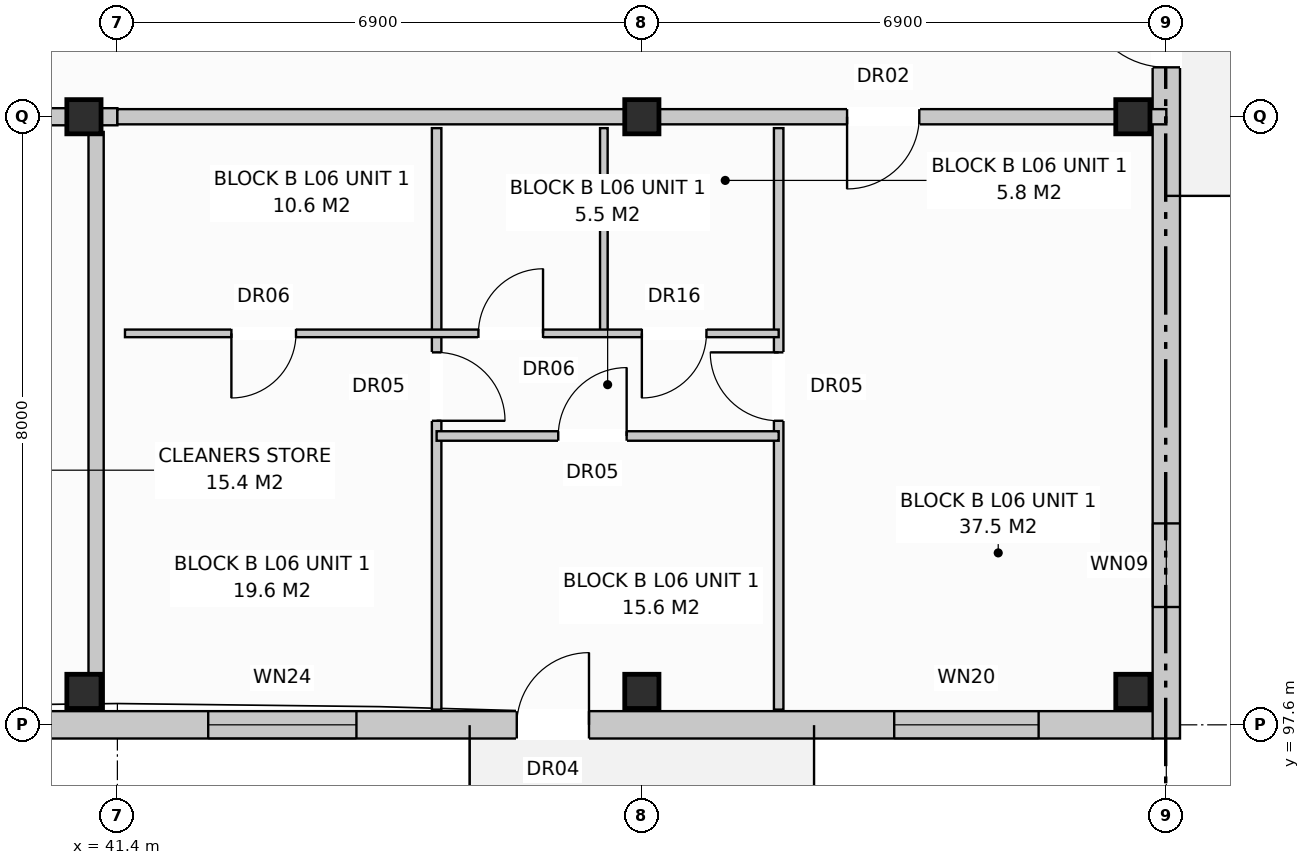
"""IFC4 building model, lengths in metres.
Left out: names, types, materials, properties, quantities, classifications, styles, units other than length and angle.
Written with IfcOpenShell. Run it as: python <this file> out.ifc"""

import sys

from ifc_helpers import new_model, si_unit, direction, frame, frame_2d, origin, origin_with_axes, origin_2d, place, context, subcontext, project, spatial, rectangle, extrude, element, fill, save


model = new_model("IFC4")
c1 = context("Model", 3, precision=1e-05, world=origin(), true_north=direction((0.0, 1.0)))
c2 = subcontext(c1, "Body", "Model", "MODEL_VIEW")
j1 = project(units=[si_unit("LENGTHUNIT", "METRE"), si_unit("PLANEANGLEUNIT", "RADIAN")], contexts=[c1])
p1 = place(None, origin())
s1 = spatial("IfcSite", under=j1, at=p1, CompositionType="ELEMENT")
p2 = place(p1, origin())
s2 = spatial("IfcBuilding", under=s1, at=p2, CompositionType="ELEMENT")
p3 = place(p2, frame((0.0, 0.0, 20.8)))
s3 = spatial("IfcBuildingStorey", under=s2, at=p3, CompositionType="ELEMENT", Elevation=20.8)
for number, where, z_axis, x_axis in (
    (1, (40.96, 98.04, 0.0), (0.0, 0.0, 1.0), (1.0, 0.0, 0.0)),
    (2, (40.96, 105.6, 0.0), (0.0, 0.0, 1.0), (1.0, 0.0, 0.0)),
    (3, (48.3, 98.04, 0.0), (0.0, 0.0, 1.0), (1.0, 0.0, 0.0)),
    (4, (48.3, 105.6, 0.0), (0.0, 0.0, 1.0), (1.0, 0.0, 0.0)),
    (5, (54.76, 98.04, 0.0), (0.0, 0.0, 1.0), (1.0, 0.0, 0.0)),
    (6, (54.76, 105.6, 0.0), (0.0, 0.0, 1.0), (1.0, 0.0, 0.0)),
):
    element("IfcColumn", number, at=place(p3, frame(where, z_axis=z_axis, x_axis=x_axis)), inside=s3, PredefinedType="COLUMN", context=c2, shape_type="SweptSolid", body=[
        extrude(rectangle(XDim=0.45, YDim=0.45, at=origin_2d()), origin(), (0.0, 0.0, 1.0), 3.2),
    ])
p4 = place(p3, frame((31.35, 97.6, 0.0), z_axis=(0.0, 0.0, 1.0), x_axis=(1.0, 0.0, 0.0)))
e7 = element("IfcWall", 7, at=p4, inside=s3, PredefinedType="STANDARD", context=c2, shape_type="SweptSolid", body=[
    extrude(rectangle(XDim=23.68, YDim=0.36, at=frame_2d((11.84, 0.0))), origin(), (0.0, 0.0, 1.0), 2.95),
])
p5 = place(p4, frame((15.304, 0.0, 0.0)))
e8 = element("IfcOpeningElement", 8, at=p5, cuts=e7, PredefinedType="OPENING", context=c2, shape_type="SweptSolid", body=[
    extrude(rectangle(XDim=0.95, YDim=2.1, at=frame_2d((0.475, 1.05))), frame((0.0, 0.192, 0.0), z_axis=(0.0, -1.0, 0.0), x_axis=(1.0, 0.0, 0.0)), (0.0, 0.0, 1.0), 0.384),
])
p6 = place(p4, frame((11.245, 0.0, 0.8)))
e9 = element("IfcOpeningElement", 9, at=p6, cuts=e7, PredefinedType="OPENING", context=c2, shape_type="SweptSolid", body=[
    extrude(rectangle(XDim=1.95, YDim=1.65, at=frame_2d((0.975, 0.825))), frame((0.0, 0.192, 0.0), z_axis=(0.0, -1.0, 0.0), x_axis=(1.0, 0.0, 0.0)), (0.0, 0.0, 1.0), 0.384),
])
p7 = place(p4, frame((20.27, 0.0, 0.8)))
e10 = element("IfcOpeningElement", 10, at=p7, cuts=e7, PredefinedType="OPENING", context=c2, shape_type="SweptSolid", body=[
    extrude(rectangle(XDim=1.9, YDim=1.85, at=frame_2d((0.95, 0.925))), frame((0.0, 0.192, 0.0), z_axis=(0.0, -1.0, 0.0), x_axis=(1.0, 0.0, 0.0)), (0.0, 0.0, 1.0), 0.384),
])
p8 = place(p3, frame((55.2, 97.42, 0.0), z_axis=(0.0, 0.0, 1.0), x_axis=(0.0, 1.0, 0.0)))
e11 = element("IfcWall", 11, at=p8, inside=s3, PredefinedType="STANDARD", context=c2, shape_type="SweptSolid", body=[
    extrude(rectangle(XDim=18.76, YDim=0.36, at=frame_2d((9.38, 0.0))), origin(), (0.0, 0.0, 1.0), 2.95),
])
p9 = place(p8, frame((8.83, 0.0, 0.0)))
e12 = element("IfcOpeningElement", 12, at=p9, cuts=e11, PredefinedType="OPENING", context=c2, shape_type="SweptSolid", body=[
    extrude(rectangle(XDim=1.1, YDim=2.1, at=frame_2d((0.55, 1.05))), frame((0.0, 0.192, 0.0), z_axis=(0.0, -1.0, 0.0), x_axis=(1.0, 0.0, 0.0)), (0.0, 0.0, 1.0), 0.384),
])
p10 = place(p8, frame((1.73, 0.0, 0.72)))
e13 = element("IfcOpeningElement", 13, at=p10, cuts=e11, PredefinedType="OPENING", context=c2, shape_type="SweptSolid", body=[
    extrude(rectangle(XDim=1.1, YDim=1.5, at=frame_2d((0.55, 0.75))), frame((0.0, 0.192, 0.0), z_axis=(0.0, -1.0, 0.0), x_axis=(1.0, 0.0, 0.0)), (0.0, 0.0, 1.0), 0.384),
])
p11 = place(p8, frame((15.93, 0.0, 0.72)))
e14 = element("IfcOpeningElement", 14, at=p11, cuts=e11, PredefinedType="OPENING", context=c2, shape_type="SweptSolid", body=[
    extrude(rectangle(XDim=1.1, YDim=1.5, at=frame_2d((0.55, 0.75))), frame((0.0, 0.192, 0.0), z_axis=(0.0, -1.0, 0.0), x_axis=(1.0, 0.0, 0.0)), (0.0, 0.0, 1.0), 0.384),
])
p12 = place(p3, frame((41.12, 97.8, 0.0), z_axis=(0.0, 0.0, 1.0), x_axis=(0.0, 1.0, 0.0)))
e15 = element("IfcWall", 15, at=p12, inside=s3, PredefinedType="PARTITIONING", context=c2, shape_type="SweptSolid", body=[
    extrude(rectangle(XDim=7.6, YDim=0.2, at=frame_2d((3.8, 0.0))), origin(), (0.0, 0.0, 1.0), 2.39),
])
p13 = place(p3, frame((31.5, 105.6, 0.0), z_axis=(0.0, 0.0, 1.0), x_axis=(1.0, 0.0, 0.0)))
e16 = element("IfcWall", 16, at=p13, inside=s3, PredefinedType="PARTITIONING", context=c2, shape_type="SweptSolid", body=[
    extrude(rectangle(XDim=9.9, YDim=0.225, at=frame_2d((4.95, 0.0))), origin(), (0.0, 0.0, 1.0), 2.39),
])
p14 = place(p13, frame((0.475, 0.0, 0.0)))
e17 = element("IfcOpeningElement", 17, at=p14, cuts=e16, PredefinedType="OPENING", context=c2, shape_type="SweptSolid", body=[
    extrude(rectangle(XDim=1.1, YDim=2.15, at=frame_2d((0.55, 1.075))), frame((0.0, 0.125, 0.0), z_axis=(0.0, -1.0, 0.0), x_axis=(1.0, 0.0, 0.0)), (0.0, 0.0, 1.0), 0.249),
])
p15 = place(p13, frame((5.75, 0.0, 0.0)))
e18 = element("IfcOpeningElement", 18, at=p15, cuts=e16, PredefinedType="OPENING", context=c2, shape_type="SweptSolid", body=[
    extrude(rectangle(XDim=0.9, YDim=2.1, at=frame_2d((0.45, 1.05))), frame((0.0, 0.125, 0.0), z_axis=(0.0, -1.0, 0.0), x_axis=(1.0, 0.0, 0.0)), (0.0, 0.0, 1.0), 0.249),
])
p16 = place(p13, frame((7.8, 0.0, 0.0)))
e19 = element("IfcOpeningElement", 19, at=p16, cuts=e16, PredefinedType="OPENING", context=c2, shape_type="SweptSolid", body=[
    extrude(rectangle(XDim=0.95, YDim=2.15, at=frame_2d((0.475, 1.075))), frame((0.0, 0.125, 0.0), z_axis=(0.0, -1.0, 0.0), x_axis=(1.0, 0.0, 0.0)), (0.0, 0.0, 1.0), 0.249),
])
p17 = place(p3, frame((41.4, 105.6, 0.0), z_axis=(0.0, 0.0, 1.0), x_axis=(1.0, 0.0, 0.0)))
e20 = element("IfcWall", 20, at=p17, inside=s3, PredefinedType="PARTITIONING", context=c2, shape_type="SweptSolid", body=[
    extrude(rectangle(XDim=13.8, YDim=0.2, at=frame_2d((6.9, 0.0))), origin(), (0.0, 0.0, 1.0), 2.39),
])
p18 = place(p17, frame((9.6, 0.0, 0.0)))
e21 = element("IfcOpeningElement", 21, at=p18, cuts=e20, PredefinedType="OPENING", context=c2, shape_type="SweptSolid", body=[
    extrude(rectangle(XDim=0.95, YDim=2.15, at=frame_2d((0.475, 1.075))), frame((0.0, 0.112, 0.0), z_axis=(0.0, -1.0, 0.0), x_axis=(1.0, 0.0, 0.0)), (0.0, 0.0, 1.0), 0.224),
])
p19 = place(p3, frame((50.1, 105.45, 0.0), z_axis=(0.0, 0.0, 1.0), x_axis=(0.0, -1.0, 0.0)))
e22 = element("IfcWall", 22, at=p19, inside=s3, PredefinedType="PARTITIONING", context=c2, shape_type="SweptSolid", body=[
    extrude(rectangle(XDim=7.65, YDim=0.125, at=frame_2d((3.825, 0.0))), origin(), (0.0, 0.0, 1.0), 2.95),
])
p20 = place(p19, frame((2.95, 0.0, 0.0)))
e23 = element("IfcOpeningElement", 23, at=p20, cuts=e22, PredefinedType="OPENING", context=c2, shape_type="SweptSolid", body=[
    extrude(rectangle(XDim=0.9, YDim=2.1, at=frame_2d((0.45, 1.05))), frame((0.0, 0.074, 0.0), z_axis=(0.0, -1.0, 0.0), x_axis=(1.0, 0.0, 0.0)), (0.0, 0.0, 1.0), 0.149),
])
p21 = place(p3, frame((45.6, 105.45, 0.0), z_axis=(0.0, 0.0, 1.0), x_axis=(0.0, -1.0, 0.0)))
e24 = element("IfcWall", 24, at=p21, inside=s3, PredefinedType="PARTITIONING", context=c2, shape_type="SweptSolid", body=[
    extrude(rectangle(XDim=7.65, YDim=0.125, at=frame_2d((3.825, 0.0))), origin(), (0.0, 0.0, 1.0), 2.95),
])
p22 = place(p21, frame((2.95, 0.0, 0.0)))
e25 = element("IfcOpeningElement", 25, at=p22, cuts=e24, PredefinedType="OPENING", context=c2, shape_type="SweptSolid", body=[
    extrude(rectangle(XDim=0.9, YDim=2.1, at=frame_2d((0.45, 1.05))), frame((0.0, 0.074, 0.0), z_axis=(0.0, -1.0, 0.0), x_axis=(1.0, 0.0, 0.0)), (0.0, 0.0, 1.0), 0.149),
])
p23 = place(p3, frame((47.8, 105.45, 0.0), z_axis=(0.0, 0.0, 1.0), x_axis=(0.0, -1.0, 0.0)))
e26 = element("IfcWall", 26, at=p23, inside=s3, PredefinedType="PARTITIONING", context=c2, shape_type="SweptSolid", body=[
    extrude(rectangle(XDim=2.7, YDim=0.1, at=frame_2d((1.35, 0.0))), origin(), (0.0, 0.0, 1.0), 2.95),
])
p24 = place(p3, frame((41.5, 102.75, 0.0), z_axis=(0.0, 0.0, 1.0), x_axis=(1.0, 0.0, 0.0)))
e27 = element("IfcWall", 27, at=p24, inside=s3, PredefinedType="PARTITIONING", context=c2, shape_type="SweptSolid", body=[
    extrude(rectangle(XDim=8.6, YDim=0.1, at=frame_2d((4.3, 0.0))), origin(), (0.0, 0.0, 1.0), 2.95),
])
p25 = place(p24, frame((1.4, 0.0, 0.0)))
e28 = element("IfcOpeningElement", 28, at=p25, cuts=e27, PredefinedType="OPENING", context=c2, shape_type="SweptSolid", body=[
    extrude(rectangle(XDim=0.85, YDim=2.05, at=frame_2d((0.425, 1.025))), frame((0.0, 0.062, 0.0), z_axis=(0.0, -1.0, 0.0), x_axis=(1.0, 0.0, 0.0)), (0.0, 0.0, 1.0), 0.124),
])
p26 = place(p24, frame((4.65, 0.0, 0.0)))
e29 = element("IfcOpeningElement", 29, at=p26, cuts=e27, PredefinedType="OPENING", context=c2, shape_type="SweptSolid", body=[
    extrude(rectangle(XDim=0.85, YDim=2.05, at=frame_2d((0.425, 1.025))), frame((0.0, 0.062, 0.0), z_axis=(0.0, -1.0, 0.0), x_axis=(1.0, 0.0, 0.0)), (0.0, 0.0, 1.0), 0.124),
])
p27 = place(p24, frame((6.8, 0.0, 0.0)))
e30 = element("IfcOpeningElement", 30, at=p27, cuts=e27, PredefinedType="OPENING", context=c2, shape_type="SweptSolid", body=[
    extrude(rectangle(XDim=0.85, YDim=2.1, at=frame_2d((0.425, 1.05))), frame((0.0, 0.062, 0.0), z_axis=(0.0, -1.0, 0.0), x_axis=(1.0, 0.0, 0.0)), (0.0, 0.0, 1.0), 0.124),
])
p28 = place(p3, frame((45.6, 101.4, 0.0), z_axis=(0.0, 0.0, 1.0), x_axis=(1.0, 0.0, 0.0)))
e31 = element("IfcWall", 31, at=p28, inside=s3, PredefinedType="PARTITIONING", context=c2, shape_type="SweptSolid", body=[
    extrude(rectangle(XDim=4.5, YDim=0.125, at=frame_2d((2.25, 0.0))), origin(), (0.0, 0.0, 1.0), 2.95),
])
p29 = place(p28, frame((1.6, 0.0, 0.0)))
e32 = element("IfcOpeningElement", 32, at=p29, cuts=e31, PredefinedType="OPENING", context=c2, shape_type="SweptSolid", body=[
    extrude(rectangle(XDim=0.9, YDim=2.1, at=frame_2d((0.45, 1.05))), frame((0.0, 0.074, 0.0), z_axis=(0.0, -1.0, 0.0), x_axis=(1.0, 0.0, 0.0)), (0.0, 0.0, 1.0), 0.149),
])
p30 = place(p5, origin_with_axes())
e33 = element("IfcDoor", 33, at=p30, inside=s3, OperationType="SINGLE_SWING_RIGHT", PredefinedType="DOOR", context=c2, shape_type="SweptSolid", body=[
    extrude(rectangle(XDim=0.95, YDim=2.1, at=frame_2d((0.475, 1.05))), frame((0.0, 0.025, 0.0), z_axis=(0.0, -1.0, 0.0), x_axis=(1.0, 0.0, 0.0)), (0.0, 0.0, 1.0), 0.05),
])
fill(e8, e33)
p31 = place(p6, origin_with_axes())
e34 = element("IfcWindow", 34, at=p31, inside=s3, PartitioningType="SINGLE_PANEL", PredefinedType="WINDOW", context=c2, shape_type="SweptSolid", body=[
    extrude(rectangle(XDim=1.95, YDim=1.65, at=frame_2d((0.975, 0.825))), frame((0.0, 0.03, 0.0), z_axis=(0.0, -1.0, 0.0), x_axis=(1.0, 0.0, 0.0)), (0.0, 0.0, 1.0), 0.06),
])
fill(e9, e34)
p32 = place(p7, origin_with_axes())
e35 = element("IfcWindow", 35, at=p32, inside=s3, PartitioningType="SINGLE_PANEL", PredefinedType="WINDOW", context=c2, shape_type="SweptSolid", body=[
    extrude(rectangle(XDim=1.9, YDim=1.85, at=frame_2d((0.95, 0.925))), frame((0.0, 0.03, 0.0), z_axis=(0.0, -1.0, 0.0), x_axis=(1.0, 0.0, 0.0)), (0.0, 0.0, 1.0), 0.06),
])
fill(e10, e35)
p33 = place(p9, origin_with_axes())
e36 = element("IfcDoor", 36, at=p33, inside=s3, OperationType="SINGLE_SWING_RIGHT", PredefinedType="DOOR", context=c2, shape_type="SweptSolid", body=[
    extrude(rectangle(XDim=1.1, YDim=2.1, at=frame_2d((0.55, 1.05))), frame((0.0, 0.025, 0.0), z_axis=(0.0, -1.0, 0.0), x_axis=(1.0, 0.0, 0.0)), (0.0, 0.0, 1.0), 0.05),
])
fill(e12, e36)
p34 = place(p10, origin_with_axes())
e37 = element("IfcWindow", 37, at=p34, inside=s3, PartitioningType="SINGLE_PANEL", PredefinedType="WINDOW", context=c2, shape_type="SweptSolid", body=[
    extrude(rectangle(XDim=1.1, YDim=1.5, at=frame_2d((0.55, 0.75))), frame((0.0, 0.03, 0.0), z_axis=(0.0, -1.0, 0.0), x_axis=(1.0, 0.0, 0.0)), (0.0, 0.0, 1.0), 0.06),
])
fill(e13, e37)
p35 = place(p18, frame((0.95, 0.0, 0.0), z_axis=(0.0, 0.0, 1.0), x_axis=(-1.0, 0.0, 0.0)))
e38 = element("IfcDoor", 38, at=p35, inside=s3, OperationType="SINGLE_SWING_LEFT", PredefinedType="DOOR", context=c2, shape_type="SweptSolid", body=[
    extrude(rectangle(XDim=0.95, YDim=2.15, at=frame_2d((0.475, 1.075))), frame((0.0, 0.025, 0.0), z_axis=(0.0, -1.0, 0.0), x_axis=(1.0, 0.0, 0.0)), (0.0, 0.0, 1.0), 0.05),
])
fill(e21, e38)
p36 = place(p20, frame((0.9, 0.0, 0.0), z_axis=(0.0, 0.0, 1.0), x_axis=(-1.0, 0.0, 0.0)))
e39 = element("IfcDoor", 39, at=p36, inside=s3, OperationType="SINGLE_SWING_LEFT", PredefinedType="DOOR", context=c2, shape_type="SweptSolid", body=[
    extrude(rectangle(XDim=0.9, YDim=2.1, at=frame_2d((0.45, 1.05))), frame((0.0, 0.025, 0.0), z_axis=(0.0, -1.0, 0.0), x_axis=(1.0, 0.0, 0.0)), (0.0, 0.0, 1.0), 0.05),
])
fill(e23, e39)
p37 = place(p22, origin_with_axes())
e40 = element("IfcDoor", 40, at=p37, inside=s3, OperationType="SINGLE_SWING_RIGHT", PredefinedType="DOOR", context=c2, shape_type="SweptSolid", body=[
    extrude(rectangle(XDim=0.9, YDim=2.1, at=frame_2d((0.45, 1.05))), frame((0.0, 0.025, 0.0), z_axis=(0.0, -1.0, 0.0), x_axis=(1.0, 0.0, 0.0)), (0.0, 0.0, 1.0), 0.05),
])
fill(e25, e40)
p38 = place(p25, frame((0.85, 0.0, 0.0), z_axis=(0.0, 0.0, 1.0), x_axis=(-1.0, 0.0, 0.0)))
e41 = element("IfcDoor", 41, at=p38, inside=s3, OperationType="SINGLE_SWING_LEFT", PredefinedType="DOOR", context=c2, shape_type="SweptSolid", body=[
    extrude(rectangle(XDim=0.85, YDim=2.05, at=frame_2d((0.425, 1.025))), frame((0.0, 0.025, 0.0), z_axis=(0.0, -1.0, 0.0), x_axis=(1.0, 0.0, 0.0)), (0.0, 0.0, 1.0), 0.05),
])
fill(e28, e41)
p39 = place(p26, origin_with_axes())
e42 = element("IfcDoor", 42, at=p39, inside=s3, OperationType="SINGLE_SWING_RIGHT", PredefinedType="DOOR", context=c2, shape_type="SweptSolid", body=[
    extrude(rectangle(XDim=0.85, YDim=2.05, at=frame_2d((0.425, 1.025))), frame((0.0, 0.025, 0.0), z_axis=(0.0, -1.0, 0.0), x_axis=(1.0, 0.0, 0.0)), (0.0, 0.0, 1.0), 0.05),
])
fill(e29, e42)
p40 = place(p27, frame((0.85, 0.0, 0.0), z_axis=(0.0, 0.0, 1.0), x_axis=(-1.0, 0.0, 0.0)))
e43 = element("IfcDoor", 43, at=p40, inside=s3, OperationType="SINGLE_SWING_LEFT", PredefinedType="DOOR", context=c2, shape_type="SweptSolid", body=[
    extrude(rectangle(XDim=0.85, YDim=2.1, at=frame_2d((0.425, 1.05))), frame((0.0, 0.025, 0.0), z_axis=(0.0, -1.0, 0.0), x_axis=(1.0, 0.0, 0.0)), (0.0, 0.0, 1.0), 0.05),
])
fill(e30, e43)
p41 = place(p29, origin_with_axes())
e44 = element("IfcDoor", 44, at=p41, inside=s3, OperationType="SINGLE_SWING_RIGHT", PredefinedType="DOOR", context=c2, shape_type="SweptSolid", body=[
    extrude(rectangle(XDim=0.9, YDim=2.1, at=frame_2d((0.45, 1.05))), frame((0.0, 0.025, 0.0), z_axis=(0.0, -1.0, 0.0), x_axis=(1.0, 0.0, 0.0)), (0.0, 0.0, 1.0), 0.05),
])
fill(e32, e44)
save(model, sys.argv[1])
